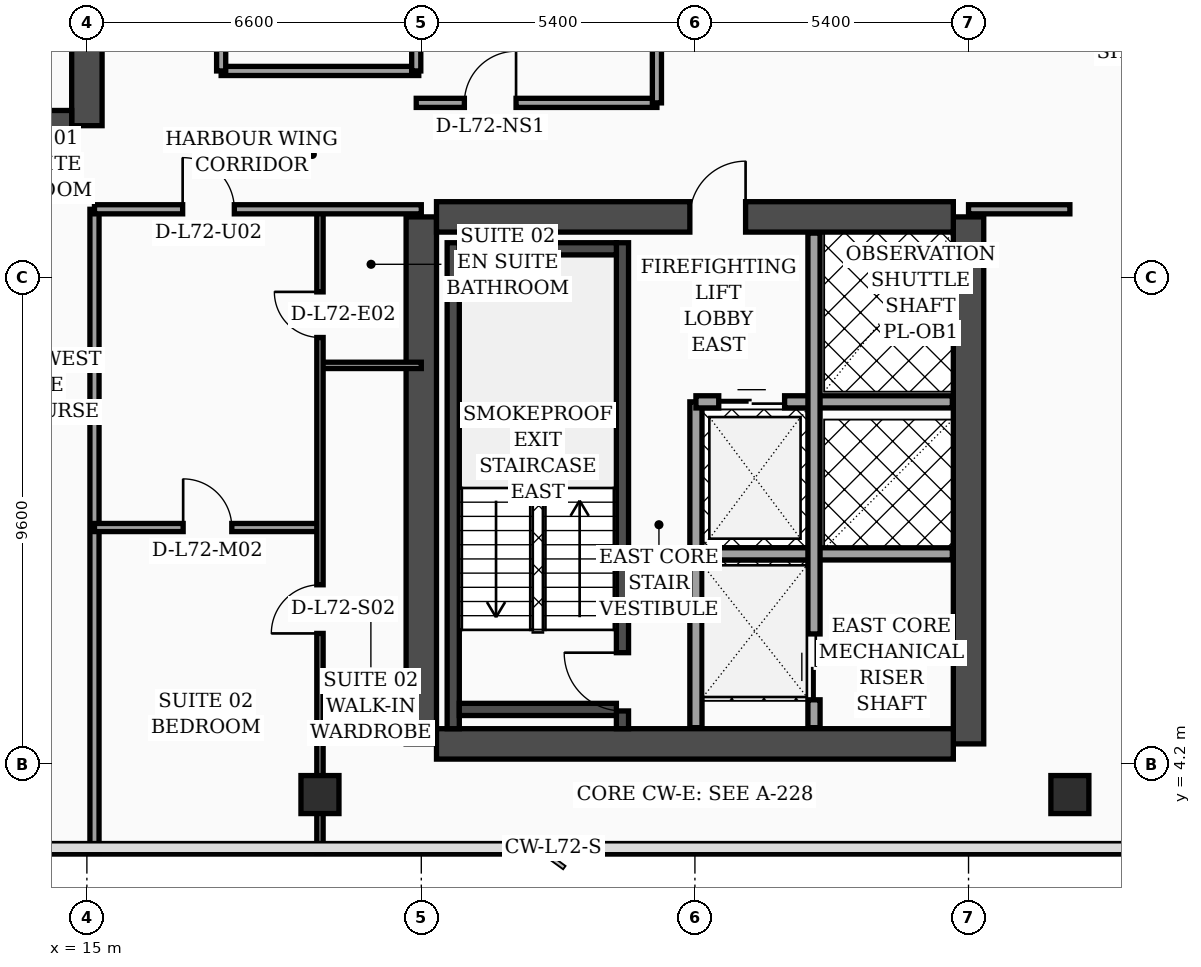
"""IFC4 building model, lengths in metres.
Left out: names, types, materials, properties, quantities, classifications, styles, units other than length and angle.
Written with IfcOpenShell. Run it as: python <this file> out.ifc"""

import sys

from ifc_helpers import new_model, si_unit, direction, frame, frame_2d, origin, origin_2d, place, context, subcontext, project, spatial, rectangle, hollow_rectangle, extrude, element, fill, save


model = new_model("IFC4")
c1 = context("Model", 3, precision=1e-05, world=origin(), true_north=direction((0.0, 1.0)))
c2 = subcontext(c1, "Body", "Model", "MODEL_VIEW")
j1 = project(units=[si_unit("LENGTHUNIT", "METRE"), si_unit("PLANEANGLEUNIT", "RADIAN")], contexts=[c1])
p1 = place(None, origin())
s1 = spatial("IfcSite", under=j1, at=p1, CompositionType="ELEMENT")
p2 = place(p1, origin())
s2 = spatial("IfcBuilding", under=s1, at=p2, CompositionType="ELEMENT")
p3 = place(p2, frame((0.0, 0.0, 291.1)))
s3 = spatial("IfcBuildingStorey", under=s2, at=p3, CompositionType="ELEMENT", Elevation=291.1)
p4 = place(p3, frame((15.0, 16.8, 0.0), z_axis=(0.0, 0.0, 1.0), x_axis=(0.0, 1.0, 0.0)))
e1 = element("IfcWall", 1, at=p4, inside=s3, PredefinedType="SHEAR", context=c2, shape_type="SweptSolid", body=[
    extrude(rectangle(XDim=21.6, YDim=0.6, at=frame_2d((10.8, 0.0))), origin(), (0.0, 0.0, 1.0), 3.56),
])
p5 = place(p4, frame((8.65, 0.0, 0.0)))
e2 = element("IfcOpeningElement", 2, at=p5, cuts=e1, PredefinedType="OPENING", context=c2, shape_type="SweptSolid", body=[
    extrude(rectangle(XDim=1.1, YDim=2.2, at=frame_2d((0.55, 1.1))), frame((0.0, 0.31, 0.0), z_axis=(0.0, -1.0, 0.0), x_axis=(1.0, 0.0, 0.0)), (0.0, 0.0, 1.0), 0.62),
])
p6 = place(p4, frame((18.9, 0.0, 0.0)))
e3 = element("IfcOpeningElement", 3, at=p6, cuts=e1, PredefinedType="OPENING", context=c2, shape_type="SweptSolid", body=[
    extrude(rectangle(XDim=1.1, YDim=2.2, at=frame_2d((0.55, 1.1))), frame((0.0, 0.31, 0.0), z_axis=(0.0, -1.0, 0.0), x_axis=(1.0, 0.0, 0.0)), (0.0, 0.0, 1.0), 0.62),
])
p7 = place(p3, frame((4.5, 16.8, 0.0), z_axis=(0.0, 0.0, 1.0), x_axis=(1.0, 0.0, 0.0)))
e4 = element("IfcWall", 4, at=p7, inside=s3, PredefinedType="SHEAR", context=c2, shape_type="SweptSolid", body=[
    extrude(rectangle(XDim=10.2, YDim=0.6, at=frame_2d((5.1, 0.0))), origin(), (0.0, 0.0, 1.0), 3.56),
])
for number, where, z_axis, x_axis in (
    (5, (21.6, 4.6, 0.0), (0.0, 0.0, 1.0), (0.0, 1.0, 0.0)),
    (6, (32.4, 4.6, 0.0), (0.0, 0.0, 1.0), (0.0, 1.0, 0.0)),
):
    element("IfcWall", number, at=place(p3, frame(where, z_axis=z_axis, x_axis=x_axis)), inside=s3, PredefinedType="SHEAR", context=c2, shape_type="SweptSolid", body=[
        extrude(rectangle(XDim=10.4, YDim=0.6, at=frame_2d((5.2, 0.0))), origin(), (0.0, 0.0, 1.0), 3.56),
    ])
p8 = place(p3, frame((21.9, 15.0, 0.0), z_axis=(0.0, 0.0, 1.0), x_axis=(1.0, 0.0, 0.0)))
e7 = element("IfcWall", 7, at=p8, inside=s3, PredefinedType="SHEAR", context=c2, shape_type="SweptSolid", body=[
    extrude(rectangle(XDim=10.2, YDim=0.6, at=frame_2d((5.1, 0.0))), origin(), (0.0, 0.0, 1.0), 3.56),
])
p9 = place(p8, frame((5.0, 0.0, 0.0)))
e8 = element("IfcOpeningElement", 8, at=p9, cuts=e7, PredefinedType="OPENING", context=c2, shape_type="SweptSolid", body=[
    extrude(rectangle(XDim=1.1, YDim=2.2, at=frame_2d((0.55, 1.1))), frame((0.0, 0.31, 0.0), z_axis=(0.0, -1.0, 0.0), x_axis=(1.0, 0.0, 0.0)), (0.0, 0.0, 1.0), 0.62),
])
p10 = place(p3, frame((21.9, 4.6, 0.0), z_axis=(0.0, 0.0, 1.0), x_axis=(1.0, 0.0, 0.0)))
e9 = element("IfcWall", 9, at=p10, inside=s3, PredefinedType="SHEAR", context=c2, shape_type="SweptSolid", body=[
    extrude(rectangle(XDim=10.2, YDim=0.6, at=frame_2d((5.1, 0.0))), origin(), (0.0, 0.0, 1.0), 3.56),
])
p11 = place(p3, frame((22.23, 4.9, 0.0), z_axis=(0.0, 0.0, 1.0), x_axis=(0.0, 1.0, 0.0)))
e10 = element("IfcWall", 10, at=p11, inside=s3, PredefinedType="SOLIDWALL", context=c2, shape_type="SweptSolid", body=[
    extrude(rectangle(XDim=9.59, YDim=0.24, at=frame_2d((4.795, 0.0))), origin(), (0.0, 0.0, 1.0), 3.56),
])
p12 = place(p3, frame((25.57, 4.9, 0.0), z_axis=(0.0, 0.0, 1.0), x_axis=(0.0, 1.0, 0.0)))
e11 = element("IfcWall", 11, at=p12, inside=s3, PredefinedType="SOLIDWALL", context=c2, shape_type="SweptSolid", body=[
    extrude(rectangle(XDim=9.59, YDim=0.24, at=frame_2d((4.795, 0.0))), origin(), (0.0, 0.0, 1.0), 3.56),
])
p13 = place(p12, frame((0.35, 0.0, 0.0)))
e12 = element("IfcOpeningElement", 12, at=p13, cuts=e11, PredefinedType="OPENING", context=c2, shape_type="SweptSolid", body=[
    extrude(rectangle(XDim=1.15, YDim=2.2, at=frame_2d((0.575, 1.1))), frame((0.0, 0.13, 0.0), z_axis=(0.0, -1.0, 0.0), x_axis=(1.0, 0.0, 0.0)), (0.0, 0.0, 1.0), 0.26),
])
for number, where, z_axis, x_axis in (
    (13, (22.35, 5.28, 0.0), (0.0, 0.0, 1.0), (1.0, 0.0, 0.0)),
    (14, (22.35, 14.37, 0.0), (0.0, 0.0, 1.0), (1.0, 0.0, 0.0)),
):
    element("IfcWall", number, at=place(p3, frame(where, z_axis=z_axis, x_axis=x_axis)), inside=s3, PredefinedType="SOLIDWALL", context=c2, shape_type="SweptSolid", body=[
        extrude(rectangle(XDim=3.1, YDim=0.24, at=frame_2d((1.55, 0.0))), origin(), (0.0, 0.0, 1.0), 3.56),
    ])
for number, where, z_axis, x_axis in (
    (15, (19.6, 3.6, 0.0), (0.0, 0.0, 1.0), (1.0, 0.0, 0.0)),
    (16, (34.4, 3.6, 0.0), (0.0, 0.0, 1.0), (1.0, 0.0, 0.0)),
):
    element("IfcColumn", number, at=place(p3, frame(where, z_axis=z_axis, x_axis=x_axis)), inside=s3, PredefinedType="COLUMN", context=c2, shape_type="SweptSolid", body=[
        extrude(hollow_rectangle(XDim=0.75, YDim=0.75, WallThickness=0.032, at=origin_2d()), origin(), (0.0, 0.0, 1.0), 3.56),
    ])
p14 = place(p3, frame((41.03, 5.505, 0.0), z_axis=(0.0, 0.0, 1.0), x_axis=(-0.300509063924, 0.953778958931, 0.0)))
e17 = element("IfcWall", 17, at=p14, inside=s3, PredefinedType="SOLIDWALL", context=c2, shape_type="SweptSolid", body=[
    extrude(rectangle(XDim=30.814, YDim=0.32, at=frame_2d((15.407, 0.0))), origin(), (0.0, 0.0, 1.0), 3.56),
])
p15 = place(p14, frame((4.747, 0.0, 0.0)))
e18 = element("IfcOpeningElement", 18, at=p15, cuts=e17, PredefinedType="OPENING", context=c2, shape_type="SweptSolid", body=[
    extrude(rectangle(XDim=1.4, YDim=2.25, at=frame_2d((0.7, 1.125))), frame((0.0, 0.17, 0.0), z_axis=(0.0, -1.0, 0.0), x_axis=(1.0, 0.0, 0.0)), (0.0, 0.0, 1.0), 0.34),
])
p16 = place(p14, frame((9.889, 0.0, 0.7)))
e19 = element("IfcOpeningElement", 19, at=p16, cuts=e17, PredefinedType="OPENING", context=c2, shape_type="SweptSolid", body=[
    extrude(rectangle(XDim=1.6, YDim=1.65, at=frame_2d((0.8, 0.825))), frame((0.0, 0.17, 0.0), z_axis=(0.0, -1.0, 0.0), x_axis=(1.0, 0.0, 0.0)), (0.0, 0.0, 1.0), 0.34),
])
p17 = place(p14, frame((18.696, 0.0, 0.7)))
e20 = element("IfcOpeningElement", 20, at=p17, cuts=e17, PredefinedType="OPENING", context=c2, shape_type="SweptSolid", body=[
    extrude(rectangle(XDim=1.6, YDim=1.65, at=frame_2d((0.8, 0.825))), frame((0.0, 0.17, 0.0), z_axis=(0.0, -1.0, 0.0), x_axis=(1.0, 0.0, 0.0)), (0.0, 0.0, 1.0), 0.34),
])
p18 = place(p14, frame((1.6, 0.0, 0.75)))
e21 = element("IfcOpeningElement", 21, at=p18, cuts=e17, PredefinedType="OPENING", context=c2, shape_type="SweptSolid", body=[
    extrude(rectangle(XDim=1.5, YDim=1.6, at=frame_2d((0.75, 0.8))), frame((0.0, 0.17, 0.0), z_axis=(0.0, -1.0, 0.0), x_axis=(1.0, 0.0, 0.0)), (0.0, 0.0, 1.0), 0.34),
])
p19 = place(p14, frame((7.8, 0.0, 0.75)))
e22 = element("IfcOpeningElement", 22, at=p19, cuts=e17, PredefinedType="OPENING", context=c2, shape_type="SweptSolid", body=[
    extrude(rectangle(XDim=1.5, YDim=1.6, at=frame_2d((0.75, 0.8))), frame((0.0, 0.17, 0.0), z_axis=(0.0, -1.0, 0.0), x_axis=(1.0, 0.0, 0.0)), (0.0, 0.0, 1.0), 0.34),
])
p20 = place(p14, frame((11.95, 0.0, 0.75)))
e23 = element("IfcOpeningElement", 23, at=p20, cuts=e17, PredefinedType="OPENING", context=c2, shape_type="SweptSolid", body=[
    extrude(rectangle(XDim=1.5, YDim=1.6, at=frame_2d((0.75, 0.8))), frame((0.0, 0.17, 0.0), z_axis=(0.0, -1.0, 0.0), x_axis=(1.0, 0.0, 0.0)), (0.0, 0.0, 1.0), 0.34),
])
p21 = place(p14, frame((14.0, 0.0, 0.75)))
e24 = element("IfcOpeningElement", 24, at=p21, cuts=e17, PredefinedType="OPENING", context=c2, shape_type="SweptSolid", body=[
    extrude(rectangle(XDim=1.5, YDim=1.6, at=frame_2d((0.75, 0.8))), frame((0.0, 0.17, 0.0), z_axis=(0.0, -1.0, 0.0), x_axis=(1.0, 0.0, 0.0)), (0.0, 0.0, 1.0), 0.34),
])
p22 = place(p14, frame((16.55, 0.0, 0.75)))
e25 = element("IfcOpeningElement", 25, at=p22, cuts=e17, PredefinedType="OPENING", context=c2, shape_type="SweptSolid", body=[
    extrude(rectangle(XDim=1.5, YDim=1.6, at=frame_2d((0.75, 0.8))), frame((0.0, 0.17, 0.0), z_axis=(0.0, -1.0, 0.0), x_axis=(1.0, 0.0, 0.0)), (0.0, 0.0, 1.0), 0.34),
])
p23 = place(p14, frame((20.75, 0.0, 0.75)))
e26 = element("IfcOpeningElement", 26, at=p23, cuts=e17, PredefinedType="OPENING", context=c2, shape_type="SweptSolid", body=[
    extrude(rectangle(XDim=1.5, YDim=1.6, at=frame_2d((0.75, 0.8))), frame((0.0, 0.17, 0.0), z_axis=(0.0, -1.0, 0.0), x_axis=(1.0, 0.0, 0.0)), (0.0, 0.0, 1.0), 0.34),
])
p24 = place(p14, frame((23.3, 0.0, 0.75)))
e27 = element("IfcOpeningElement", 27, at=p24, cuts=e17, PredefinedType="OPENING", context=c2, shape_type="SweptSolid", body=[
    extrude(rectangle(XDim=1.5, YDim=1.6, at=frame_2d((0.75, 0.8))), frame((0.0, 0.17, 0.0), z_axis=(0.0, -1.0, 0.0), x_axis=(1.0, 0.0, 0.0)), (0.0, 0.0, 1.0), 0.34),
])
p25 = place(p14, frame((26.4, 0.0, 0.75)))
e28 = element("IfcOpeningElement", 28, at=p25, cuts=e17, PredefinedType="OPENING", context=c2, shape_type="SweptSolid", body=[
    extrude(rectangle(XDim=1.5, YDim=1.6, at=frame_2d((0.75, 0.8))), frame((0.0, 0.17, 0.0), z_axis=(0.0, -1.0, 0.0), x_axis=(1.0, 0.0, 0.0)), (0.0, 0.0, 1.0), 0.34),
])
p26 = place(p3, frame((27.02, 4.92, 0.0), z_axis=(0.0, 0.0, 1.0), x_axis=(0.0, 1.0, 0.0)))
e29 = element("IfcWall", 29, at=p26, inside=s3, PredefinedType="SOLIDWALL", context=c2, shape_type="SweptSolid", body=[
    extrude(rectangle(XDim=6.43, YDim=0.24, at=frame_2d((3.215, 0.0))), origin(), (0.0, 0.0, 1.0), 3.56),
])
p27 = place(p3, frame((27.02, 11.35, 0.0), z_axis=(0.0, 0.0, 1.0), x_axis=(1.0, 0.0, 0.0)))
e30 = element("IfcWall", 30, at=p27, inside=s3, PredefinedType="SOLIDWALL", context=c2, shape_type="SweptSolid", body=[
    extrude(rectangle(XDim=5.06, YDim=0.24, at=frame_2d((2.53, 0.0))), origin(), (0.0, 0.0, 1.0), 3.56),
])
p28 = place(p27, frame((0.45, 0.0, 0.0)))
e31 = element("IfcOpeningElement", 31, at=p28, cuts=e30, PredefinedType="OPENING", context=c2, shape_type="SweptSolid", body=[
    extrude(rectangle(XDim=1.3, YDim=2.35, at=frame_2d((0.65, 1.175))), frame((0.0, 0.13, 0.0), z_axis=(0.0, -1.0, 0.0), x_axis=(1.0, 0.0, 0.0)), (0.0, 0.0, 1.0), 0.26),
])
p29 = place(p3, frame((27.02, 8.35, 0.0), z_axis=(0.0, 0.0, 1.0), x_axis=(1.0, 0.0, 0.0)))
e32 = element("IfcWall", 32, at=p29, inside=s3, PredefinedType="SOLIDWALL", context=c2, shape_type="SweptSolid", body=[
    extrude(rectangle(XDim=5.06, YDim=0.24, at=frame_2d((2.53, 0.0))), origin(), (0.0, 0.0, 1.0), 3.56),
])
p30 = place(p3, frame((29.35, 4.92, 0.0), z_axis=(0.0, 0.0, 1.0), x_axis=(0.0, 1.0, 0.0)))
e33 = element("IfcWall", 33, at=p30, inside=s3, PredefinedType="SOLIDWALL", context=c2, shape_type="SweptSolid", body=[
    extrude(rectangle(XDim=9.76, YDim=0.24, at=frame_2d((4.88, 0.0))), origin(), (0.0, 0.0, 1.0), 3.56),
])
p31 = place(p30, frame((0.55, 0.0, 0.0)))
e34 = element("IfcOpeningElement", 34, at=p31, cuts=e33, PredefinedType="OPENING", context=c2, shape_type="SweptSolid", body=[
    extrude(rectangle(XDim=1.3, YDim=2.35, at=frame_2d((0.65, 1.175))), frame((0.0, 0.13, 0.0), z_axis=(0.0, -1.0, 0.0), x_axis=(1.0, 0.0, 0.0)), (0.0, 0.0, 1.0), 0.26),
])
p32 = place(p3, frame((15.15, 2.44, 0.0), z_axis=(0.0, 0.0, 1.0), x_axis=(0.0, 1.0, 0.0)))
e35 = element("IfcWall", 35, at=p32, inside=s3, PredefinedType="PARTITIONING", context=c2, shape_type="SweptSolid", body=[
    extrude(rectangle(XDim=12.71, YDim=0.18, at=frame_2d((6.355, 0.0))), origin(), (0.0, 0.0, 1.0), 3.09),
])
p33 = place(p3, frame((19.6, 12.07, 0.0), z_axis=(0.0, 0.0, 1.0), x_axis=(1.0, 0.0, 0.0)))
e36 = element("IfcWall", 36, at=p33, inside=s3, PredefinedType="PARTITIONING", context=c2, shape_type="SweptSolid", body=[
    extrude(rectangle(XDim=2.0, YDim=0.125, at=frame_2d((1.0, 0.0))), origin(), (0.0, 0.0, 1.0), 3.56),
])
p34 = place(p3, frame((15.15, 8.87, 0.0), z_axis=(0.0, 0.0, 1.0), x_axis=(1.0, 0.0, 0.0)))
e37 = element("IfcWall", 37, at=p34, inside=s3, PredefinedType="PARTITIONING", context=c2, shape_type="SweptSolid", body=[
    extrude(rectangle(XDim=4.45, YDim=0.16, at=frame_2d((2.225, 0.0))), origin(), (0.0, 0.0, 1.0), 3.56),
])
p35 = place(p34, frame((1.75, 0.0, 0.0)))
e38 = element("IfcOpeningElement", 38, at=p35, cuts=e37, PredefinedType="OPENING", context=c2, shape_type="SweptSolid", body=[
    extrude(rectangle(XDim=0.96, YDim=2.2, at=frame_2d((0.48, 1.1))), frame((0.0, 0.09, 0.0), z_axis=(0.0, -1.0, 0.0), x_axis=(1.0, 0.0, 0.0)), (0.0, 0.0, 1.0), 0.18),
])
p36 = place(p3, frame((19.6, 2.44, 0.0), z_axis=(0.0, 0.0, 1.0), x_axis=(0.0, 1.0, 0.0)))
e39 = element("IfcWall", 39, at=p36, inside=s3, PredefinedType="PARTITIONING", context=c2, shape_type="SweptSolid", body=[
    extrude(rectangle(XDim=12.71, YDim=0.125, at=frame_2d((6.355, 0.0))), origin(), (0.0, 0.0, 1.0), 2.59),
])
p37 = place(p36, frame((4.34, 0.0, 0.0)))
e40 = element("IfcOpeningElement", 40, at=p37, cuts=e39, PredefinedType="OPENING", context=c2, shape_type="SweptSolid", body=[
    extrude(rectangle(XDim=0.96, YDim=2.2, at=frame_2d((0.48, 1.1))), frame((0.0, 0.073, 0.0), z_axis=(0.0, -1.0, 0.0), x_axis=(1.0, 0.0, 0.0)), (0.0, 0.0, 1.0), 0.145),
])
p38 = place(p36, frame((10.18, 0.0, 0.0)))
e41 = element("IfcOpeningElement", 41, at=p38, cuts=e39, PredefinedType="OPENING", context=c2, shape_type="SweptSolid", body=[
    extrude(rectangle(XDim=0.9, YDim=2.15, at=frame_2d((0.45, 1.075))), frame((0.0, 0.073, 0.0), z_axis=(0.0, -1.0, 0.0), x_axis=(1.0, 0.0, 0.0)), (0.0, 0.0, 1.0), 0.145),
])
p39 = place(p3, frame((15.15, 15.15, 0.0), z_axis=(0.0, 0.0, 1.0), x_axis=(1.0, 0.0, 0.0)))
e42 = element("IfcWall", 42, at=p39, inside=s3, PredefinedType="PARTITIONING", context=c2, shape_type="SweptSolid", body=[
    extrude(rectangle(XDim=6.45, YDim=0.18, at=frame_2d((3.225, 0.0))), origin(), (0.0, 0.0, 1.0), 2.59),
])
p40 = place(p39, frame((1.74, 0.0, 0.0)))
e43 = element("IfcOpeningElement", 43, at=p40, cuts=e42, PredefinedType="OPENING", context=c2, shape_type="SweptSolid", body=[
    extrude(rectangle(XDim=1.02, YDim=2.2, at=frame_2d((0.51, 1.1))), frame((0.0, 0.1, 0.0), z_axis=(0.0, -1.0, 0.0), x_axis=(1.0, 0.0, 0.0)), (0.0, 0.0, 1.0), 0.2),
])
p41 = place(p3, frame((17.65, 17.88, 0.0), z_axis=(0.0, 0.0, 1.0), x_axis=(1.0, 0.0, 0.0)))
e44 = element("IfcWall", 44, at=p41, inside=s3, PredefinedType="PARTITIONING", context=c2, shape_type="SweptSolid", body=[
    extrude(rectangle(XDim=3.9, YDim=0.18, at=frame_2d((1.95, 0.0))), origin(), (0.0, 0.0, 1.0), 3.09),
])
p42 = place(p3, frame((21.5, 17.88, 0.0), z_axis=(0.0, 0.0, 1.0), x_axis=(0.0, 1.0, 0.0)))
e45 = element("IfcWall", 45, at=p42, inside=s3, PredefinedType="PARTITIONING", context=c2, shape_type="SweptSolid", body=[
    extrude(rectangle(XDim=6.44, YDim=0.18, at=frame_2d((3.22, 0.0))), origin(), (0.0, 0.0, 1.0), 3.09),
])
p43 = place(p3, frame((17.65, 17.88, 0.0), z_axis=(0.0, 0.0, 1.0), x_axis=(0.0, 1.0, 0.0)))
e46 = element("IfcWall", 46, at=p43, inside=s3, PredefinedType="PARTITIONING", context=c2, shape_type="SweptSolid", body=[
    extrude(rectangle(XDim=6.44, YDim=0.18, at=frame_2d((3.22, 0.0))), origin(), (0.0, 0.0, 1.0), 3.09),
])
p44 = place(p43, frame((0.65, 0.0, 0.0)))
e47 = element("IfcOpeningElement", 47, at=p44, cuts=e46, PredefinedType="OPENING", context=c2, shape_type="SweptSolid", body=[
    extrude(rectangle(XDim=0.98, YDim=2.15, at=frame_2d((0.49, 1.075))), frame((0.0, 0.1, 0.0), z_axis=(0.0, -1.0, 0.0), x_axis=(1.0, 0.0, 0.0)), (0.0, 0.0, 1.0), 0.2),
])
p45 = place(p43, frame((3.97, 0.0, 0.0)))
e48 = element("IfcOpeningElement", 48, at=p45, cuts=e46, PredefinedType="OPENING", context=c2, shape_type="SweptSolid", body=[
    extrude(rectangle(XDim=0.96, YDim=2.2, at=frame_2d((0.48, 1.1))), frame((0.0, 0.1, 0.0), z_axis=(0.0, -1.0, 0.0), x_axis=(1.0, 0.0, 0.0)), (0.0, 0.0, 1.0), 0.2),
])
p46 = place(p3, frame((32.4, 15.15, 0.0), z_axis=(0.0, 0.0, 1.0), x_axis=(1.0, 0.0, 0.0)))
e49 = element("IfcWall", 49, at=p46, inside=s3, PredefinedType="PARTITIONING", context=c2, shape_type="SweptSolid", body=[
    extrude(rectangle(XDim=2.0, YDim=0.18, at=frame_2d((1.0, 0.0))), origin(), (0.0, 0.0, 1.0), 2.99),
])
p47 = place(p3, frame((21.5, 17.25, 0.0), z_axis=(0.0, 0.0, 1.0), x_axis=(1.0, 0.0, 0.0)))
e50 = element("IfcWall", 50, at=p47, inside=s3, PredefinedType="PARTITIONING", context=c2, shape_type="SweptSolid", body=[
    extrude(rectangle(XDim=4.75, YDim=0.18, at=frame_2d((2.375, 0.0))), origin(), (0.0, 0.0, 1.0), 3.56),
])
p48 = place(p47, frame((0.95, 0.0, 0.0)))
e51 = element("IfcOpeningElement", 51, at=p48, cuts=e50, PredefinedType="OPENING", context=c2, shape_type="SweptSolid", body=[
    extrude(rectangle(XDim=1.02, YDim=2.2, at=frame_2d((0.51, 1.1))), frame((0.0, 0.1, 0.0), z_axis=(0.0, -1.0, 0.0), x_axis=(1.0, 0.0, 0.0)), (0.0, 0.0, 1.0), 0.2),
])
p49 = place(p3, frame((26.25, 17.25, 0.0), z_axis=(0.0, 0.0, 1.0), x_axis=(0.0, 1.0, 0.0)))
e52 = element("IfcWall", 52, at=p49, inside=s3, PredefinedType="PARTITIONING", context=c2, shape_type="SweptSolid", body=[
    extrude(rectangle(XDim=17.43, YDim=0.18, at=frame_2d((8.715, 0.0))), origin(), (0.0, 0.0, 1.0), 3.09),
])
p50 = place(p28, origin())
e53 = element("IfcDoor", 53, at=p50, inside=s3, OperationType="DOUBLE_DOOR_SLIDING", PredefinedType="DOOR", context=c2, shape_type="SweptSolid", body=[
    extrude(rectangle(XDim=1.3, YDim=2.35, at=frame_2d((0.65, 1.175))), frame((0.0, 0.025, 0.0), z_axis=(0.0, -1.0, 0.0), x_axis=(1.0, 0.0, 0.0)), (0.0, 0.0, 1.0), 0.05),
])
fill(e31, e53)
p51 = place(p31, origin())
e54 = element("IfcDoor", 54, at=p51, inside=s3, OperationType="DOUBLE_DOOR_SLIDING", PredefinedType="DOOR", context=c2, shape_type="SweptSolid", body=[
    extrude(rectangle(XDim=1.3, YDim=2.35, at=frame_2d((0.65, 1.175))), frame((0.0, 0.025, 0.0), z_axis=(0.0, -1.0, 0.0), x_axis=(1.0, 0.0, 0.0)), (0.0, 0.0, 1.0), 0.05),
])
fill(e34, e54)
p52 = place(p35, origin())
e55 = element("IfcDoor", 55, at=p52, inside=s3, OperationType="SINGLE_SWING_LEFT", PredefinedType="DOOR", context=c2, shape_type="SweptSolid", body=[
    extrude(rectangle(XDim=0.96, YDim=2.2, at=frame_2d((0.48, 1.1))), frame((0.0, 0.025, 0.0), z_axis=(0.0, -1.0, 0.0), x_axis=(1.0, 0.0, 0.0)), (0.0, 0.0, 1.0), 0.05),
])
fill(e38, e55)
p53 = place(p37, origin())
e56 = element("IfcDoor", 56, at=p53, inside=s3, OperationType="SINGLE_SWING_LEFT", PredefinedType="DOOR", context=c2, shape_type="SweptSolid", body=[
    extrude(rectangle(XDim=0.96, YDim=2.2, at=frame_2d((0.48, 1.1))), frame((0.0, 0.025, 0.0), z_axis=(0.0, -1.0, 0.0), x_axis=(1.0, 0.0, 0.0)), (0.0, 0.0, 1.0), 0.05),
])
fill(e40, e56)
p54 = place(p38, origin())
e57 = element("IfcDoor", 57, at=p54, inside=s3, OperationType="SINGLE_SWING_RIGHT", PredefinedType="DOOR", context=c2, shape_type="SweptSolid", body=[
    extrude(rectangle(XDim=0.9, YDim=2.15, at=frame_2d((0.45, 1.075))), frame((0.0, 0.025, 0.0), z_axis=(0.0, -1.0, 0.0), x_axis=(1.0, 0.0, 0.0)), (0.0, 0.0, 1.0), 0.05),
])
fill(e41, e57)
p55 = place(p40, origin())
e58 = element("IfcDoor", 58, at=p55, inside=s3, OperationType="SINGLE_SWING_LEFT", PredefinedType="DOOR", context=c2, shape_type="SweptSolid", body=[
    extrude(rectangle(XDim=1.02, YDim=2.2, at=frame_2d((0.51, 1.1))), frame((0.0, 0.025, 0.0), z_axis=(0.0, -1.0, 0.0), x_axis=(1.0, 0.0, 0.0)), (0.0, 0.0, 1.0), 0.05),
])
fill(e43, e58)
p56 = place(p48, origin())
e59 = element("IfcDoor", 59, at=p56, inside=s3, OperationType="SINGLE_SWING_RIGHT", PredefinedType="DOOR", context=c2, shape_type="SweptSolid", body=[
    extrude(rectangle(XDim=1.02, YDim=2.2, at=frame_2d((0.51, 1.1))), frame((0.0, 0.025, 0.0), z_axis=(0.0, -1.0, 0.0), x_axis=(1.0, 0.0, 0.0)), (0.0, 0.0, 1.0), 0.05),
])
fill(e51, e59)
p57 = place(p13, origin())
e60 = element("IfcDoor", 60, at=p57, inside=s3, OperationType="SINGLE_SWING_RIGHT", PredefinedType="DOOR", context=c2, shape_type="SweptSolid", body=[
    extrude(rectangle(XDim=1.15, YDim=2.2, at=frame_2d((0.575, 1.1))), frame((0.0, 0.025, 0.0), z_axis=(0.0, -1.0, 0.0), x_axis=(1.0, 0.0, 0.0)), (0.0, 0.0, 1.0), 0.05),
])
fill(e12, e60)
p58 = place(p9, origin())
e61 = element("IfcDoor", 61, at=p58, inside=s3, OperationType="SINGLE_SWING_RIGHT", PredefinedType="DOOR", context=c2, shape_type="SweptSolid", body=[
    extrude(rectangle(XDim=1.1, YDim=2.2, at=frame_2d((0.55, 1.1))), frame((0.0, 0.025, 0.0), z_axis=(0.0, -1.0, 0.0), x_axis=(1.0, 0.0, 0.0)), (0.0, 0.0, 1.0), 0.05),
])
fill(e8, e61)
save(model, sys.argv[1])
